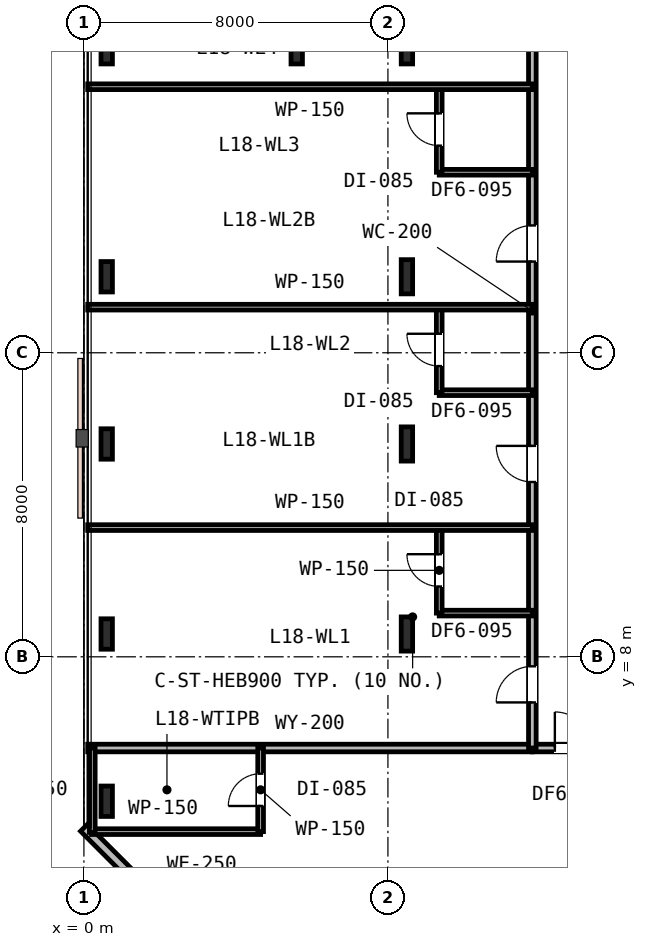
"""IFC4 building model, lengths in metres.
Left out: names, types, materials, properties, quantities, classifications, styles, units other than length and angle.
Written with IfcOpenShell. Run it as: python <this file> out.ifc"""

import sys

from ifc_helpers import new_model, si_unit, direction, frame, frame_2d, origin, origin_2d, place, context, subcontext, project, spatial, rectangle, i_section, extrude, element, fill, save


model = new_model("IFC4")
c1 = context("Model", 3, precision=1e-05, world=origin(), true_north=direction((0.0, 1.0)))
c2 = subcontext(c1, "Body", "Model", "MODEL_VIEW")
j1 = project(units=[si_unit("LENGTHUNIT", "METRE"), si_unit("PLANEANGLEUNIT", "RADIAN")], contexts=[c1])
p1 = place(None, origin())
s1 = spatial("IfcSite", under=j1, at=p1, CompositionType="ELEMENT")
p2 = place(p1, origin())
s2 = spatial("IfcBuilding", under=s1, at=p2, CompositionType="ELEMENT")
p3 = place(p2, frame((0.0, 0.0, 72.6)))
s3 = spatial("IfcBuildingStorey", under=s2, at=p3, CompositionType="ELEMENT", Elevation=72.6)
for number, where, z_axis, x_axis in (
    (1, (8.5, 24.0, 0.0), (0.0, 0.0, 1.0), (1.0, 0.0, 0.0)),
    (2, (5.6, 24.0, 0.0), (0.0, 0.0, 1.0), (1.0, 0.0, 0.0)),
    (3, (0.6, 24.0, 0.0), (0.0, 0.0, 1.0), (1.0, 0.0, 0.0)),
    (4, (0.6, 8.6, 0.0), (0.0, 0.0, 1.0), (1.0, 0.0, 0.0)),
    (5, (0.6, 13.6, 0.0), (0.0, 0.0, 1.0), (1.0, 0.0, 0.0)),
    (6, (0.6, 18.0, 0.0), (0.0, 0.0, 1.0), (1.0, 0.0, 0.0)),
    (7, (0.6, 4.2, 0.0), (0.0, 0.0, 1.0), (1.0, 0.0, 0.0)),
):
    element("IfcColumn", number, at=place(p3, frame(where, z_axis=z_axis, x_axis=x_axis)), inside=s3, PredefinedType="COLUMN", context=c2, shape_type="SweptSolid", body=[
        extrude(i_section(OverallWidth=0.3, OverallDepth=0.8, WebThickness=0.018, FlangeThickness=0.033, FilletRadius=0.03, at=origin_2d()), origin(), (0.0, 0.0, 1.0), 3.6),
    ])
for number, where, z_axis, x_axis in (
    (8, (8.5, 8.6, 0.0), (0.0, 0.0, 1.0), (1.0, 0.0, 0.0)),
    (9, (8.5, 13.6, 0.0), (0.0, 0.0, 1.0), (1.0, 0.0, 0.0)),
    (10, (8.5, 18.0, 0.0), (0.0, 0.0, 1.0), (1.0, 0.0, 0.0)),
):
    element("IfcColumn", number, at=place(p3, frame(where, z_axis=z_axis, x_axis=x_axis)), inside=s3, PredefinedType="COLUMN", context=c2, shape_type="SweptSolid", body=[
        extrude(i_section(OverallWidth=0.3, OverallDepth=0.9, WebThickness=0.018, FlangeThickness=0.035, FilletRadius=0.03, at=origin_2d()), origin(), (0.0, 0.0, 1.0), 3.6),
    ])
p4 = place(p3, frame((0.0, 3.5, 0.0), z_axis=(0.0, 0.0, 1.0), x_axis=(0.707106781187, -0.707106781187, 0.0)))
e11 = element("IfcWall", 11, at=p4, inside=s3, PredefinedType="STANDARD", context=c2, shape_type="SweptSolid", body=[
    extrude(rectangle(XDim=4.95, YDim=0.25, at=frame_2d((2.475, 0.0))), origin(), (0.0, 0.0, 1.0), 3.33),
])
p5 = place(p4, frame((1.685, 0.0, 0.75)))
e12 = element("IfcOpeningElement", 12, at=p5, cuts=e11, PredefinedType="OPENING", context=c2, shape_type="SweptSolid", body=[
    extrude(rectangle(XDim=1.8, YDim=1.85, at=frame_2d((0.9, 0.925))), frame((0.0, 0.135, 0.0), z_axis=(0.0, -1.0, 0.0), x_axis=(1.0, 0.0, 0.0)), (0.0, 0.0, 1.0), 0.27),
])
p6 = place(p3, frame((0.1, 5.6, 0.0), z_axis=(0.0, 0.0, 1.0), x_axis=(1.0, 0.0, 0.0)))
e13 = element("IfcWall", 13, at=p6, inside=s3, PredefinedType="PARTITIONING", context=c2, shape_type="SweptSolid", body=[
    extrude(rectangle(XDim=11.7, YDim=0.2, at=frame_2d((5.85, 0.0))), origin(), (0.0, 0.0, 1.0), 2.92),
])
p7 = place(p3, frame((11.8, 5.6, 0.0), z_axis=(0.0, 0.0, 1.0), x_axis=(1.0, 0.0, 0.0)))
e14 = element("IfcWall", 14, at=p7, inside=s3, PredefinedType="PARTITIONING", context=c2, shape_type="SweptSolid", body=[
    extrude(rectangle(XDim=2.2, YDim=0.2, at=frame_2d((1.1, 0.0))), origin(), (0.0, 0.0, 1.0), 3.33),
])
p8 = place(p7, frame((0.593, 0.0, 0.0)))
e15 = element("IfcOpeningElement", 15, at=p8, cuts=e14, PredefinedType="OPENING", context=c2, shape_type="SweptSolid", body=[
    extrude(rectangle(XDim=0.95, YDim=2.15, at=frame_2d((0.475, 1.075))), frame((0.0, 0.11, 0.0), z_axis=(0.0, -1.0, 0.0), x_axis=(1.0, 0.0, 0.0)), (0.0, 0.0, 1.0), 0.22),
])
p9 = place(p3, frame((0.2, 3.4, 0.0), z_axis=(0.0, 0.0, 1.0), x_axis=(1.0, 0.0, 0.0)))
e16 = element("IfcWall", 16, at=p9, inside=s3, PredefinedType="PARTITIONING", context=c2, shape_type="SweptSolid", body=[
    extrude(rectangle(XDim=4.45, YDim=0.15, at=frame_2d((2.225, 0.0))), origin(), (0.0, 0.0, 1.0), 3.33),
])
p10 = place(p3, frame((4.65, 3.4, 0.0), z_axis=(0.0, 0.0, 1.0), x_axis=(0.0, 1.0, 0.0)))
e17 = element("IfcWall", 17, at=p10, inside=s3, PredefinedType="PARTITIONING", context=c2, shape_type="SweptSolid", body=[
    extrude(rectangle(XDim=2.2, YDim=0.15, at=frame_2d((1.1, 0.0))), origin(), (0.0, 0.0, 1.0), 3.33),
])
p11 = place(p10, frame((0.675, 0.0, 0.0)))
e18 = element("IfcOpeningElement", 18, at=p11, cuts=e17, PredefinedType="OPENING", context=c2, shape_type="SweptSolid", body=[
    extrude(rectangle(XDim=0.85, YDim=2.15, at=frame_2d((0.425, 1.075))), frame((0.0, 0.085, 0.0), z_axis=(0.0, -1.0, 0.0), x_axis=(1.0, 0.0, 0.0)), (0.0, 0.0, 1.0), 0.17),
])
p12 = place(p3, frame((0.22, 3.38, 0.0), z_axis=(0.0, 0.0, 1.0), x_axis=(0.0, 1.0, 0.0)))
e19 = element("IfcWall", 19, at=p12, inside=s3, PredefinedType="PARTITIONING", context=c2, shape_type="SweptSolid", body=[
    extrude(rectangle(XDim=2.22, YDim=0.15, at=frame_2d((1.11, 0.0))), origin(), (0.0, 0.0, 1.0), 2.92),
])
p13 = place(p3, frame((11.8, 5.6, 0.0), z_axis=(0.0, 0.0, 1.0), x_axis=(0.0, 1.0, 0.0)))
e20 = element("IfcWall", 20, at=p13, inside=s3, PredefinedType="PARTITIONING", context=c2, shape_type="SweptSolid", body=[
    extrude(rectangle(XDim=23.0, YDim=0.2, at=frame_2d((11.5, 0.0))), origin(), (0.0, 0.0, 1.0), 2.83),
])
p14 = place(p13, frame((1.2, 0.0, 0.0)))
e21 = element("IfcOpeningElement", 21, at=p14, cuts=e20, PredefinedType="OPENING", context=c2, shape_type="SweptSolid", body=[
    extrude(rectangle(XDim=0.95, YDim=2.15, at=frame_2d((0.475, 1.075))), frame((0.0, 0.11, 0.0), z_axis=(0.0, -1.0, 0.0), x_axis=(1.0, 0.0, 0.0)), (0.0, 0.0, 1.0), 0.22),
])
p15 = place(p13, frame((7.0, 0.0, 0.0)))
e22 = element("IfcOpeningElement", 22, at=p15, cuts=e20, PredefinedType="OPENING", context=c2, shape_type="SweptSolid", body=[
    extrude(rectangle(XDim=0.95, YDim=2.15, at=frame_2d((0.475, 1.075))), frame((0.0, 0.11, 0.0), z_axis=(0.0, -1.0, 0.0), x_axis=(1.0, 0.0, 0.0)), (0.0, 0.0, 1.0), 0.22),
])
p16 = place(p13, frame((12.8, 0.0, 0.0)))
e23 = element("IfcOpeningElement", 23, at=p16, cuts=e20, PredefinedType="OPENING", context=c2, shape_type="SweptSolid", body=[
    extrude(rectangle(XDim=0.95, YDim=2.15, at=frame_2d((0.475, 1.075))), frame((0.0, 0.11, 0.0), z_axis=(0.0, -1.0, 0.0), x_axis=(1.0, 0.0, 0.0)), (0.0, 0.0, 1.0), 0.22),
])
p17 = place(p13, frame((18.515, 0.0, 0.0)))
e24 = element("IfcOpeningElement", 24, at=p17, cuts=e20, PredefinedType="OPENING", context=c2, shape_type="SweptSolid", body=[
    extrude(rectangle(XDim=0.95, YDim=2.15, at=frame_2d((0.475, 1.075))), frame((0.0, 0.11, 0.0), z_axis=(0.0, -1.0, 0.0), x_axis=(1.0, 0.0, 0.0)), (0.0, 0.0, 1.0), 0.22),
])
p18 = place(p3, frame((9.35, 9.15, 0.0), z_axis=(0.0, 0.0, 1.0), x_axis=(1.0, 0.0, 0.0)))
e25 = element("IfcWall", 25, at=p18, inside=s3, PredefinedType="PARTITIONING", context=c2, shape_type="SweptSolid", body=[
    extrude(rectangle(XDim=2.45, YDim=0.15, at=frame_2d((1.225, 0.0))), origin(), (0.0, 0.0, 1.0), 3.02),
])
p19 = place(p3, frame((9.35, 9.15, 0.0), z_axis=(0.0, 0.0, 1.0), x_axis=(0.0, 1.0, 0.0)))
e26 = element("IfcWall", 26, at=p19, inside=s3, PredefinedType="PARTITIONING", context=c2, shape_type="SweptSolid", body=[
    extrude(rectangle(XDim=2.25, YDim=0.15, at=frame_2d((1.125, 0.0))), origin(), (0.0, 0.0, 1.0), 3.33),
])
p20 = place(p19, frame((0.7, 0.0, 0.0)))
e27 = element("IfcOpeningElement", 27, at=p20, cuts=e26, PredefinedType="OPENING", context=c2, shape_type="SweptSolid", body=[
    extrude(rectangle(XDim=0.85, YDim=2.15, at=frame_2d((0.425, 1.075))), frame((0.0, 0.085, 0.0), z_axis=(0.0, -1.0, 0.0), x_axis=(1.0, 0.0, 0.0)), (0.0, 0.0, 1.0), 0.17),
])
p21 = place(p3, frame((0.1, 11.4, 0.0), z_axis=(0.0, 0.0, 1.0), x_axis=(1.0, 0.0, 0.0)))
e28 = element("IfcWall", 28, at=p21, inside=s3, PredefinedType="PARTITIONING", context=c2, shape_type="SweptSolid", body=[
    extrude(rectangle(XDim=11.7, YDim=0.15, at=frame_2d((5.85, 0.0))), origin(), (0.0, 0.0, 1.0), 2.83),
])
p22 = place(p3, frame((9.35, 14.95, 0.0), z_axis=(0.0, 0.0, 1.0), x_axis=(1.0, 0.0, 0.0)))
e29 = element("IfcWall", 29, at=p22, inside=s3, PredefinedType="PARTITIONING", context=c2, shape_type="SweptSolid", body=[
    extrude(rectangle(XDim=2.45, YDim=0.15, at=frame_2d((1.225, 0.0))), origin(), (0.0, 0.0, 1.0), 3.02),
])
p23 = place(p3, frame((9.35, 14.95, 0.0), z_axis=(0.0, 0.0, 1.0), x_axis=(0.0, 1.0, 0.0)))
e30 = element("IfcWall", 30, at=p23, inside=s3, PredefinedType="PARTITIONING", context=c2, shape_type="SweptSolid", body=[
    extrude(rectangle(XDim=2.25, YDim=0.15, at=frame_2d((1.125, 0.0))), origin(), (0.0, 0.0, 1.0), 3.33),
])
p24 = place(p23, frame((0.7, 0.0, 0.0)))
e31 = element("IfcOpeningElement", 31, at=p24, cuts=e30, PredefinedType="OPENING", context=c2, shape_type="SweptSolid", body=[
    extrude(rectangle(XDim=0.85, YDim=2.15, at=frame_2d((0.425, 1.075))), frame((0.0, 0.085, 0.0), z_axis=(0.0, -1.0, 0.0), x_axis=(1.0, 0.0, 0.0)), (0.0, 0.0, 1.0), 0.17),
])
p25 = place(p3, frame((0.1, 17.2, 0.0), z_axis=(0.0, 0.0, 1.0), x_axis=(1.0, 0.0, 0.0)))
e32 = element("IfcWall", 32, at=p25, inside=s3, PredefinedType="PARTITIONING", context=c2, shape_type="SweptSolid", body=[
    extrude(rectangle(XDim=11.7, YDim=0.15, at=frame_2d((5.85, 0.0))), origin(), (0.0, 0.0, 1.0), 2.83),
])
p26 = place(p3, frame((9.35, 20.75, 0.0), z_axis=(0.0, 0.0, 1.0), x_axis=(1.0, 0.0, 0.0)))
e33 = element("IfcWall", 33, at=p26, inside=s3, PredefinedType="PARTITIONING", context=c2, shape_type="SweptSolid", body=[
    extrude(rectangle(XDim=2.45, YDim=0.15, at=frame_2d((1.225, 0.0))), origin(), (0.0, 0.0, 1.0), 3.33),
])
p27 = place(p3, frame((9.35, 20.75, 0.0), z_axis=(0.0, 0.0, 1.0), x_axis=(0.0, 1.0, 0.0)))
e34 = element("IfcWall", 34, at=p27, inside=s3, PredefinedType="PARTITIONING", context=c2, shape_type="SweptSolid", body=[
    extrude(rectangle(XDim=2.25, YDim=0.15, at=frame_2d((1.125, 0.0))), origin(), (0.0, 0.0, 1.0), 3.33),
])
p28 = place(p27, frame((0.7, 0.0, 0.0)))
e35 = element("IfcOpeningElement", 35, at=p28, cuts=e34, PredefinedType="OPENING", context=c2, shape_type="SweptSolid", body=[
    extrude(rectangle(XDim=0.85, YDim=2.15, at=frame_2d((0.425, 1.075))), frame((0.0, 0.085, 0.0), z_axis=(0.0, -1.0, 0.0), x_axis=(1.0, 0.0, 0.0)), (0.0, 0.0, 1.0), 0.17),
])
p29 = place(p3, frame((0.1, 23.0, 0.0), z_axis=(0.0, 0.0, 1.0), x_axis=(1.0, 0.0, 0.0)))
e36 = element("IfcWall", 36, at=p29, inside=s3, PredefinedType="PARTITIONING", context=c2, shape_type="SweptSolid", body=[
    extrude(rectangle(XDim=11.7, YDim=0.15, at=frame_2d((5.85, 0.0))), origin(), (0.0, 0.0, 1.0), 2.83),
])
p30 = place(p8, origin())
e37 = element("IfcDoor", 37, at=p30, inside=s3, OperationType="SINGLE_SWING_LEFT", PredefinedType="DOOR", context=c2, shape_type="SweptSolid", body=[
    extrude(rectangle(XDim=0.95, YDim=2.15, at=frame_2d((0.475, 1.075))), frame((0.0, 0.025, 0.0), z_axis=(0.0, -1.0, 0.0), x_axis=(1.0, 0.0, 0.0)), (0.0, 0.0, 1.0), 0.05),
])
fill(e15, e37)
p31 = place(p11, origin())
e38 = element("IfcDoor", 38, at=p31, inside=s3, OperationType="SINGLE_SWING_LEFT", PredefinedType="DOOR", context=c2, shape_type="SweptSolid", body=[
    extrude(rectangle(XDim=0.85, YDim=2.15, at=frame_2d((0.425, 1.075))), frame((0.0, 0.025, 0.0), z_axis=(0.0, -1.0, 0.0), x_axis=(1.0, 0.0, 0.0)), (0.0, 0.0, 1.0), 0.05),
])
fill(e18, e38)
p32 = place(p14, origin())
e39 = element("IfcDoor", 39, at=p32, inside=s3, OperationType="SINGLE_SWING_LEFT", PredefinedType="DOOR", context=c2, shape_type="SweptSolid", body=[
    extrude(rectangle(XDim=0.95, YDim=2.15, at=frame_2d((0.475, 1.075))), frame((0.0, 0.025, 0.0), z_axis=(0.0, -1.0, 0.0), x_axis=(1.0, 0.0, 0.0)), (0.0, 0.0, 1.0), 0.05),
])
fill(e21, e39)
p33 = place(p20, origin())
e40 = element("IfcDoor", 40, at=p33, inside=s3, OperationType="SINGLE_SWING_RIGHT", PredefinedType="DOOR", context=c2, shape_type="SweptSolid", body=[
    extrude(rectangle(XDim=0.85, YDim=2.15, at=frame_2d((0.425, 1.075))), frame((0.0, 0.025, 0.0), z_axis=(0.0, -1.0, 0.0), x_axis=(1.0, 0.0, 0.0)), (0.0, 0.0, 1.0), 0.05),
])
fill(e27, e40)
p34 = place(p15, origin())
e41 = element("IfcDoor", 41, at=p34, inside=s3, OperationType="SINGLE_SWING_RIGHT", PredefinedType="DOOR", context=c2, shape_type="SweptSolid", body=[
    extrude(rectangle(XDim=0.95, YDim=2.15, at=frame_2d((0.475, 1.075))), frame((0.0, 0.025, 0.0), z_axis=(0.0, -1.0, 0.0), x_axis=(1.0, 0.0, 0.0)), (0.0, 0.0, 1.0), 0.05),
])
fill(e22, e41)
p35 = place(p24, origin())
e42 = element("IfcDoor", 42, at=p35, inside=s3, OperationType="SINGLE_SWING_RIGHT", PredefinedType="DOOR", context=c2, shape_type="SweptSolid", body=[
    extrude(rectangle(XDim=0.85, YDim=2.15, at=frame_2d((0.425, 1.075))), frame((0.0, 0.025, 0.0), z_axis=(0.0, -1.0, 0.0), x_axis=(1.0, 0.0, 0.0)), (0.0, 0.0, 1.0), 0.05),
])
fill(e31, e42)
p36 = place(p16, origin())
e43 = element("IfcDoor", 43, at=p36, inside=s3, OperationType="SINGLE_SWING_LEFT", PredefinedType="DOOR", context=c2, shape_type="SweptSolid", body=[
    extrude(rectangle(XDim=0.95, YDim=2.15, at=frame_2d((0.475, 1.075))), frame((0.0, 0.025, 0.0), z_axis=(0.0, -1.0, 0.0), x_axis=(1.0, 0.0, 0.0)), (0.0, 0.0, 1.0), 0.05),
])
fill(e23, e43)
p37 = place(p28, origin())
e44 = element("IfcDoor", 44, at=p37, inside=s3, OperationType="SINGLE_SWING_RIGHT", PredefinedType="DOOR", context=c2, shape_type="SweptSolid", body=[
    extrude(rectangle(XDim=0.85, YDim=2.15, at=frame_2d((0.425, 1.075))), frame((0.0, 0.025, 0.0), z_axis=(0.0, -1.0, 0.0), x_axis=(1.0, 0.0, 0.0)), (0.0, 0.0, 1.0), 0.05),
])
fill(e35, e44)
save(model, sys.argv[1])
